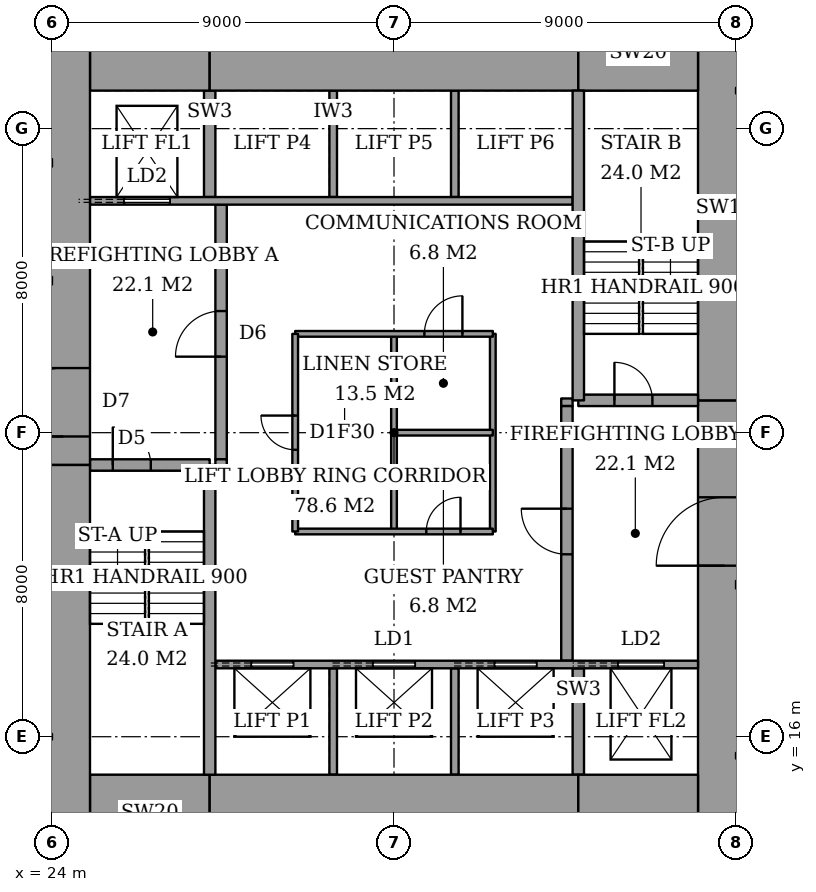
"""IFC4 building model, lengths in metres.
Left out: names, types, materials, properties, quantities, classifications, styles, units other than length and angle.
Written with IfcOpenShell. Run it as: python <this file> out.ifc"""

import sys

from ifc_helpers import new_model, si_unit, direction, frame, frame_2d, origin, place, context, subcontext, project, spatial, rectangle, extrude, element, fill, save


model = new_model("IFC4")
c1 = context("Model", 3, precision=1e-05, world=origin(), true_north=direction((0.0, 1.0)))
c2 = subcontext(c1, "Body", "Model", "MODEL_VIEW")
j1 = project(units=[si_unit("LENGTHUNIT", "METRE"), si_unit("PLANEANGLEUNIT", "RADIAN")], contexts=[c1])
p1 = place(None, origin())
s1 = spatial("IfcSite", under=j1, at=p1, CompositionType="ELEMENT")
p2 = place(p1, origin())
s2 = spatial("IfcBuilding", under=s1, at=p2, CompositionType="ELEMENT")
p3 = place(p2, frame((0.0, 0.0, 44.0)))
s3 = spatial("IfcBuildingStorey", under=s2, at=p3, CompositionType="ELEMENT", Elevation=44.0)
p4 = place(p3, frame((25.0, 14.0, 0.0), z_axis=(0.0, 0.0, 1.0), x_axis=(1.0, 0.0, 0.0)))
e1 = element("IfcWall", 1, at=p4, inside=s3, PredefinedType="SHEAR", context=c2, shape_type="SweptSolid", body=[
    extrude(rectangle(XDim=3.15, YDim=2.0, at=frame_2d((1.575, 0.0))), origin(), (0.0, 0.0, 1.0), 3.6),
])
p5 = place(p3, frame((28.15, 14.0, 0.0), z_axis=(0.0, 0.0, 1.0), x_axis=(1.0, 0.0, 0.0)))
e2 = element("IfcWall", 2, at=p5, inside=s3, PredefinedType="SHEAR", context=c2, shape_type="SweptSolid", body=[
    extrude(rectangle(XDim=9.7, YDim=2.0, at=frame_2d((4.85, 0.0))), origin(), (0.0, 0.0, 1.0), 3.6),
])
for number, where, z_axis, x_axis in (
    (3, (37.85, 14.0, 0.0), (0.0, 0.0, 1.0), (1.0, 0.0, 0.0)),
    (4, (25.0, 34.0, 0.0), (0.0, 0.0, 1.0), (1.0, 0.0, 0.0)),
):
    element("IfcWall", number, at=place(p3, frame(where, z_axis=z_axis, x_axis=x_axis)), inside=s3, PredefinedType="SHEAR", context=c2, shape_type="SweptSolid", body=[
        extrude(rectangle(XDim=3.15, YDim=2.0, at=frame_2d((1.575, 0.0))), origin(), (0.0, 0.0, 1.0), 3.6),
    ])
p6 = place(p3, frame((28.15, 34.0, 0.0), z_axis=(0.0, 0.0, 1.0), x_axis=(1.0, 0.0, 0.0)))
e5 = element("IfcWall", 5, at=p6, inside=s3, PredefinedType="SHEAR", context=c2, shape_type="SweptSolid", body=[
    extrude(rectangle(XDim=9.7, YDim=2.0, at=frame_2d((4.85, 0.0))), origin(), (0.0, 0.0, 1.0), 3.6),
])
p7 = place(p3, frame((37.85, 34.0, 0.0), z_axis=(0.0, 0.0, 1.0), x_axis=(1.0, 0.0, 0.0)))
e6 = element("IfcWall", 6, at=p7, inside=s3, PredefinedType="SHEAR", context=c2, shape_type="SweptSolid", body=[
    extrude(rectangle(XDim=3.15, YDim=2.0, at=frame_2d((1.575, 0.0))), origin(), (0.0, 0.0, 1.0), 3.6),
])
p8 = place(p3, frame((24.3, 13.0, 0.0), z_axis=(0.0, 0.0, 1.0), x_axis=(0.0, 1.0, 0.0)))
e7 = element("IfcWall", 7, at=p8, inside=s3, PredefinedType="SHEAR", context=c2, shape_type="SweptSolid", body=[
    extrude(rectangle(XDim=10.15, YDim=1.4, at=frame_2d((5.075, 0.0))), origin(), (0.0, 0.0, 1.0), 3.6),
])
p9 = place(p3, frame((24.3, 23.15, 0.0), z_axis=(0.0, 0.0, 1.0), x_axis=(0.0, 1.0, 0.0)))
e8 = element("IfcWall", 8, at=p9, inside=s3, PredefinedType="SHEAR", context=c2, shape_type="SweptSolid", body=[
    extrude(rectangle(XDim=11.85, YDim=1.4, at=frame_2d((5.925, 0.0))), origin(), (0.0, 0.0, 1.0), 3.6),
])
p10 = place(p9, frame((0.75, 0.0, 0.0)))
e9 = element("IfcOpeningElement", 9, at=p10, cuts=e8, PredefinedType="OPENING", context=c2, shape_type="SweptSolid", body=[
    extrude(rectangle(XDim=1.8, YDim=2.4, at=frame_2d((0.9, 1.2))), frame((0.0, 0.71, 0.0), z_axis=(0.0, -1.0, 0.0), x_axis=(1.0, 0.0, 0.0)), (0.0, 0.0, 1.0), 1.42),
])
p11 = place(p3, frame((41.7, 13.0, 0.0), z_axis=(0.0, 0.0, 1.0), x_axis=(0.0, 1.0, 0.0)))
e10 = element("IfcWall", 10, at=p11, inside=s3, PredefinedType="SHEAR", context=c2, shape_type="SweptSolid", body=[
    extrude(rectangle(XDim=11.85, YDim=1.4, at=frame_2d((5.925, 0.0))), origin(), (0.0, 0.0, 1.0), 3.6),
])
p12 = place(p11, frame((7.5, 0.0, 0.0)))
e11 = element("IfcOpeningElement", 11, at=p12, cuts=e10, PredefinedType="OPENING", context=c2, shape_type="SweptSolid", body=[
    extrude(rectangle(XDim=1.8, YDim=2.4, at=frame_2d((0.9, 1.2))), frame((0.0, 0.71, 0.0), z_axis=(0.0, -1.0, 0.0), x_axis=(1.0, 0.0, 0.0)), (0.0, 0.0, 1.0), 1.42),
])
p13 = place(p3, frame((41.7, 24.85, 0.0), z_axis=(0.0, 0.0, 1.0), x_axis=(0.0, 1.0, 0.0)))
e12 = element("IfcWall", 12, at=p13, inside=s3, PredefinedType="SHEAR", context=c2, shape_type="SweptSolid", body=[
    extrude(rectangle(XDim=10.15, YDim=1.4, at=frame_2d((5.075, 0.0))), origin(), (0.0, 0.0, 1.0), 3.6),
])
p14 = place(p3, frame((28.15, 15.0, 0.0), z_axis=(0.0, 0.0, 1.0), x_axis=(0.0, 1.0, 0.0)))
e13 = element("IfcWall", 13, at=p14, inside=s3, PredefinedType="SHEAR", context=c2, shape_type="SweptSolid", body=[
    extrude(rectangle(XDim=8.15, YDim=0.3, at=frame_2d((4.075, 0.0))), origin(), (0.0, 0.0, 1.0), 3.6),
])
p15 = place(p3, frame((25.0, 23.15, 0.0), z_axis=(0.0, 0.0, 1.0), x_axis=(1.0, 0.0, 0.0)))
e14 = element("IfcWall", 14, at=p15, inside=s3, PredefinedType="SHEAR", context=c2, shape_type="SweptSolid", body=[
    extrude(rectangle(XDim=3.15, YDim=0.3, at=frame_2d((1.575, 0.0))), origin(), (0.0, 0.0, 1.0), 3.6),
])
p16 = place(p15, frame((0.6, 0.0, 0.0)))
e15 = element("IfcOpeningElement", 15, at=p16, cuts=e14, PredefinedType="OPENING", context=c2, shape_type="SweptSolid", body=[
    extrude(rectangle(XDim=1.0, YDim=2.1, at=frame_2d((0.5, 1.05))), frame((0.0, 0.16, 0.0), z_axis=(0.0, -1.0, 0.0), x_axis=(1.0, 0.0, 0.0)), (0.0, 0.0, 1.0), 0.32),
])
p17 = place(p3, frame((37.85, 24.85, 0.0), z_axis=(0.0, 0.0, 1.0), x_axis=(0.0, 1.0, 0.0)))
e16 = element("IfcWall", 16, at=p17, inside=s3, PredefinedType="SHEAR", context=c2, shape_type="SweptSolid", body=[
    extrude(rectangle(XDim=8.15, YDim=0.3, at=frame_2d((4.075, 0.0))), origin(), (0.0, 0.0, 1.0), 3.6),
])
p18 = place(p3, frame((37.85, 24.85, 0.0), z_axis=(0.0, 0.0, 1.0), x_axis=(1.0, 0.0, 0.0)))
e17 = element("IfcWall", 17, at=p18, inside=s3, PredefinedType="SHEAR", context=c2, shape_type="SweptSolid", body=[
    extrude(rectangle(XDim=3.15, YDim=0.3, at=frame_2d((1.575, 0.0))), origin(), (0.0, 0.0, 1.0), 3.6),
])
p19 = place(p18, frame((0.95, 0.0, 0.0)))
e18 = element("IfcOpeningElement", 18, at=p19, cuts=e17, PredefinedType="OPENING", context=c2, shape_type="SweptSolid", body=[
    extrude(rectangle(XDim=1.0, YDim=2.1, at=frame_2d((0.5, 1.05))), frame((0.0, 0.16, 0.0), z_axis=(0.0, -1.0, 0.0), x_axis=(1.0, 0.0, 0.0)), (0.0, 0.0, 1.0), 0.32),
])
p20 = place(p3, frame((28.45, 23.3, 0.0), z_axis=(0.0, 0.0, 1.0), x_axis=(0.0, 1.0, 0.0)))
e19 = element("IfcWall", 19, at=p20, inside=s3, PredefinedType="PARTITIONING", context=c2, shape_type="SweptSolid", body=[
    extrude(rectangle(XDim=6.7, YDim=0.3, at=frame_2d((3.35, 0.0))), origin(), (0.0, 0.0, 1.0), 3.6),
])
p21 = place(p20, frame((2.7, 0.0, 0.0)))
e20 = element("IfcOpeningElement", 20, at=p21, cuts=e19, PredefinedType="OPENING", context=c2, shape_type="SweptSolid", body=[
    extrude(rectangle(XDim=1.2, YDim=2.1, at=frame_2d((0.6, 1.05))), frame((0.0, 0.16, 0.0), z_axis=(0.0, -1.0, 0.0), x_axis=(1.0, 0.0, 0.0)), (0.0, 0.0, 1.0), 0.32),
])
p22 = place(p3, frame((37.55, 18.0, 0.0), z_axis=(0.0, 0.0, 1.0), x_axis=(0.0, 1.0, 0.0)))
e21 = element("IfcWall", 21, at=p22, inside=s3, PredefinedType="PARTITIONING", context=c2, shape_type="SweptSolid", body=[
    extrude(rectangle(XDim=6.7, YDim=0.3, at=frame_2d((3.35, 0.0))), origin(), (0.0, 0.0, 1.0), 3.6),
])
p23 = place(p22, frame((2.8, 0.0, 0.0)))
e22 = element("IfcOpeningElement", 22, at=p23, cuts=e21, PredefinedType="OPENING", context=c2, shape_type="SweptSolid", body=[
    extrude(rectangle(XDim=1.2, YDim=2.1, at=frame_2d((0.6, 1.05))), frame((0.0, 0.16, 0.0), z_axis=(0.0, -1.0, 0.0), x_axis=(1.0, 0.0, 0.0)), (0.0, 0.0, 1.0), 0.32),
])
p24 = place(p3, frame((28.3, 17.9, 0.0), z_axis=(0.0, 0.0, 1.0), x_axis=(1.0, 0.0, 0.0)))
e23 = element("IfcWall", 23, at=p24, inside=s3, PredefinedType="PARTITIONING", context=c2, shape_type="SweptSolid", body=[
    extrude(rectangle(XDim=12.7, YDim=0.2, at=frame_2d((6.35, 0.0))), origin(), (0.0, 0.0, 1.0), 3.6),
])
p25 = place(p24, frame((0.95, 0.0, 0.0)))
e24 = element("IfcOpeningElement", 24, at=p25, cuts=e23, PredefinedType="OPENING", context=c2, shape_type="SweptSolid", body=[
    extrude(rectangle(XDim=1.1, YDim=2.1, at=frame_2d((0.55, 1.05))), frame((0.0, 0.11, 0.0), z_axis=(0.0, -1.0, 0.0), x_axis=(1.0, 0.0, 0.0)), (0.0, 0.0, 1.0), 0.22),
])
p26 = place(p24, frame((4.15, 0.0, 0.0)))
e25 = element("IfcOpeningElement", 25, at=p26, cuts=e23, PredefinedType="OPENING", context=c2, shape_type="SweptSolid", body=[
    extrude(rectangle(XDim=1.1, YDim=2.1, at=frame_2d((0.55, 1.05))), frame((0.0, 0.11, 0.0), z_axis=(0.0, -1.0, 0.0), x_axis=(1.0, 0.0, 0.0)), (0.0, 0.0, 1.0), 0.22),
])
p27 = place(p24, frame((7.35, 0.0, 0.0)))
e26 = element("IfcOpeningElement", 26, at=p27, cuts=e23, PredefinedType="OPENING", context=c2, shape_type="SweptSolid", body=[
    extrude(rectangle(XDim=1.1, YDim=2.1, at=frame_2d((0.55, 1.05))), frame((0.0, 0.11, 0.0), z_axis=(0.0, -1.0, 0.0), x_axis=(1.0, 0.0, 0.0)), (0.0, 0.0, 1.0), 0.22),
])
p28 = place(p24, frame((10.6, 0.0, 0.0)))
e27 = element("IfcOpeningElement", 27, at=p28, cuts=e23, PredefinedType="OPENING", context=c2, shape_type="SweptSolid", body=[
    extrude(rectangle(XDim=1.2, YDim=2.1, at=frame_2d((0.6, 1.05))), frame((0.0, 0.11, 0.0), z_axis=(0.0, -1.0, 0.0), x_axis=(1.0, 0.0, 0.0)), (0.0, 0.0, 1.0), 0.22),
])
p29 = place(p3, frame((25.0, 30.1, 0.0), z_axis=(0.0, 0.0, 1.0), x_axis=(1.0, 0.0, 0.0)))
e28 = element("IfcWall", 28, at=p29, inside=s3, PredefinedType="PARTITIONING", context=c2, shape_type="SweptSolid", body=[
    extrude(rectangle(XDim=12.7, YDim=0.2, at=frame_2d((6.35, 0.0))), origin(), (0.0, 0.0, 1.0), 3.6),
])
p30 = place(p29, frame((0.9, 0.0, 0.0)))
e29 = element("IfcOpeningElement", 29, at=p30, cuts=e28, PredefinedType="OPENING", context=c2, shape_type="SweptSolid", body=[
    extrude(rectangle(XDim=1.2, YDim=2.1, at=frame_2d((0.6, 1.05))), frame((0.0, 0.11, 0.0), z_axis=(0.0, -1.0, 0.0), x_axis=(1.0, 0.0, 0.0)), (0.0, 0.0, 1.0), 0.22),
])
for number, where, z_axis, x_axis in (
    (30, (31.4, 15.0, 0.0), (0.0, 0.0, 1.0), (0.0, 1.0, 0.0)),
    (31, (34.6, 15.0, 0.0), (0.0, 0.0, 1.0), (0.0, 1.0, 0.0)),
):
    element("IfcWall", number, at=place(p3, frame(where, z_axis=z_axis, x_axis=x_axis)), inside=s3, PredefinedType="PARTITIONING", context=c2, shape_type="SweptSolid", body=[
        extrude(rectangle(XDim=2.8, YDim=0.2, at=frame_2d((1.4, 0.0))), origin(), (0.0, 0.0, 1.0), 3.6),
    ])
p31 = place(p3, frame((37.85, 15.0, 0.0), z_axis=(0.0, 0.0, 1.0), x_axis=(0.0, 1.0, 0.0)))
e32 = element("IfcWall", 32, at=p31, inside=s3, PredefinedType="SHEAR", context=c2, shape_type="SweptSolid", body=[
    extrude(rectangle(XDim=2.8, YDim=0.3, at=frame_2d((1.4, 0.0))), origin(), (0.0, 0.0, 1.0), 3.6),
])
for number, where, z_axis, x_axis in (
    (33, (31.4, 30.2, 0.0), (0.0, 0.0, 1.0), (0.0, 1.0, 0.0)),
    (34, (34.6, 30.2, 0.0), (0.0, 0.0, 1.0), (0.0, 1.0, 0.0)),
):
    element("IfcWall", number, at=place(p3, frame(where, z_axis=z_axis, x_axis=x_axis)), inside=s3, PredefinedType="PARTITIONING", context=c2, shape_type="SweptSolid", body=[
        extrude(rectangle(XDim=2.8, YDim=0.2, at=frame_2d((1.4, 0.0))), origin(), (0.0, 0.0, 1.0), 3.6),
    ])
p32 = place(p3, frame((28.15, 30.2, 0.0), z_axis=(0.0, 0.0, 1.0), x_axis=(0.0, 1.0, 0.0)))
e35 = element("IfcWall", 35, at=p32, inside=s3, PredefinedType="SHEAR", context=c2, shape_type="SweptSolid", body=[
    extrude(rectangle(XDim=2.8, YDim=0.3, at=frame_2d((1.4, 0.0))), origin(), (0.0, 0.0, 1.0), 3.6),
])
for number, where, z_axis, x_axis in (
    (36, (28.3, 23.2, 0.0), (0.0, 0.0, 1.0), (1.0, 0.0, 0.0)),
    (37, (37.4, 24.8, 0.0), (0.0, 0.0, 1.0), (1.0, 0.0, 0.0)),
):
    element("IfcWall", number, at=place(p3, frame(where, z_axis=z_axis, x_axis=x_axis)), inside=s3, PredefinedType="PARTITIONING", context=c2, shape_type="SweptSolid", body=[
        extrude(rectangle(XDim=0.3, YDim=0.2, at=frame_2d((0.15, 0.0))), origin(), (0.0, 0.0, 1.0), 3.6),
    ])
p33 = place(p3, frame((30.4, 21.4, 0.0), z_axis=(0.0, 0.0, 1.0), x_axis=(1.0, 0.0, 0.0)))
e38 = element("IfcWall", 38, at=p33, inside=s3, PredefinedType="PARTITIONING", context=c2, shape_type="SweptSolid", body=[
    extrude(rectangle(XDim=5.2, YDim=0.15, at=frame_2d((2.6, 0.0))), origin(), (0.0, 0.0, 1.0), 3.35),
])
p34 = place(p33, frame((3.45, 0.0, 0.0)))
e39 = element("IfcOpeningElement", 39, at=p34, cuts=e38, PredefinedType="OPENING", context=c2, shape_type="SweptSolid", body=[
    extrude(rectangle(XDim=0.9, YDim=2.1, at=frame_2d((0.45, 1.05))), frame((0.0, 0.085, 0.0), z_axis=(0.0, -1.0, 0.0), x_axis=(1.0, 0.0, 0.0)), (0.0, 0.0, 1.0), 0.17),
])
p35 = place(p3, frame((30.4, 26.6, 0.0), z_axis=(0.0, 0.0, 1.0), x_axis=(1.0, 0.0, 0.0)))
e40 = element("IfcWall", 40, at=p35, inside=s3, PredefinedType="PARTITIONING", context=c2, shape_type="SweptSolid", body=[
    extrude(rectangle(XDim=5.2, YDim=0.15, at=frame_2d((2.6, 0.0))), origin(), (0.0, 0.0, 1.0), 3.35),
])
p36 = place(p35, frame((3.4, 0.0, 0.0)))
e41 = element("IfcOpeningElement", 41, at=p36, cuts=e40, PredefinedType="OPENING", context=c2, shape_type="SweptSolid", body=[
    extrude(rectangle(XDim=1.0, YDim=2.1, at=frame_2d((0.5, 1.05))), frame((0.0, 0.085, 0.0), z_axis=(0.0, -1.0, 0.0), x_axis=(1.0, 0.0, 0.0)), (0.0, 0.0, 1.0), 0.17),
])
p37 = place(p3, frame((30.4, 21.4, 0.0), z_axis=(0.0, 0.0, 1.0), x_axis=(0.0, 1.0, 0.0)))
e42 = element("IfcWall", 42, at=p37, inside=s3, PredefinedType="PARTITIONING", context=c2, shape_type="SweptSolid", body=[
    extrude(rectangle(XDim=5.2, YDim=0.15, at=frame_2d((2.6, 0.0))), origin(), (0.0, 0.0, 1.0), 3.35),
])
p38 = place(p37, frame((2.15, 0.0, 0.0)))
e43 = element("IfcOpeningElement", 43, at=p38, cuts=e42, PredefinedType="OPENING", context=c2, shape_type="SweptSolid", body=[
    extrude(rectangle(XDim=0.9, YDim=2.1, at=frame_2d((0.45, 1.05))), frame((0.0, 0.085, 0.0), z_axis=(0.0, -1.0, 0.0), x_axis=(1.0, 0.0, 0.0)), (0.0, 0.0, 1.0), 0.17),
])
p39 = place(p3, frame((35.6, 21.4, 0.0), z_axis=(0.0, 0.0, 1.0), x_axis=(0.0, 1.0, 0.0)))
e44 = element("IfcWall", 44, at=p39, inside=s3, PredefinedType="PARTITIONING", context=c2, shape_type="SweptSolid", body=[
    extrude(rectangle(XDim=5.2, YDim=0.15, at=frame_2d((2.6, 0.0))), origin(), (0.0, 0.0, 1.0), 3.35),
])
p40 = place(p3, frame((33.0, 24.0, 0.0), z_axis=(0.0, 0.0, 1.0), x_axis=(1.0, 0.0, 0.0)))
e45 = element("IfcWall", 45, at=p40, inside=s3, PredefinedType="PARTITIONING", context=c2, shape_type="SweptSolid", body=[
    extrude(rectangle(XDim=2.6, YDim=0.15, at=frame_2d((1.3, 0.0))), origin(), (0.0, 0.0, 1.0), 3.35),
])
p41 = place(p3, frame((33.0, 21.4, 0.0), z_axis=(0.0, 0.0, 1.0), x_axis=(0.0, 1.0, 0.0)))
e46 = element("IfcWall", 46, at=p41, inside=s3, PredefinedType="PARTITIONING", context=c2, shape_type="SweptSolid", body=[
    extrude(rectangle(XDim=5.2, YDim=0.15, at=frame_2d((2.6, 0.0))), origin(), (0.0, 0.0, 1.0), 3.35),
])
p42 = place(p16, origin())
e47 = element("IfcDoor", 47, at=p42, inside=s3, OperationType="SINGLE_SWING_RIGHT", PredefinedType="DOOR", context=c2, shape_type="SweptSolid", body=[
    extrude(rectangle(XDim=1.0, YDim=2.1, at=frame_2d((0.5, 1.05))), frame((0.0, 0.025, 0.0), z_axis=(0.0, -1.0, 0.0), x_axis=(1.0, 0.0, 0.0)), (0.0, 0.0, 1.0), 0.05),
])
fill(e15, e47)
p43 = place(p19, origin())
e48 = element("IfcDoor", 48, at=p43, inside=s3, OperationType="SINGLE_SWING_RIGHT", PredefinedType="DOOR", context=c2, shape_type="SweptSolid", body=[
    extrude(rectangle(XDim=1.0, YDim=2.1, at=frame_2d((0.5, 1.05))), frame((0.0, 0.025, 0.0), z_axis=(0.0, -1.0, 0.0), x_axis=(1.0, 0.0, 0.0)), (0.0, 0.0, 1.0), 0.05),
])
fill(e18, e48)
p44 = place(p21, origin())
e49 = element("IfcDoor", 49, at=p44, inside=s3, OperationType="SINGLE_SWING_RIGHT", PredefinedType="DOOR", context=c2, shape_type="SweptSolid", body=[
    extrude(rectangle(XDim=1.2, YDim=2.1, at=frame_2d((0.6, 1.05))), frame((0.0, 0.025, 0.0), z_axis=(0.0, -1.0, 0.0), x_axis=(1.0, 0.0, 0.0)), (0.0, 0.0, 1.0), 0.05),
])
fill(e20, e49)
p45 = place(p23, origin())
e50 = element("IfcDoor", 50, at=p45, inside=s3, OperationType="SINGLE_SWING_LEFT", PredefinedType="DOOR", context=c2, shape_type="SweptSolid", body=[
    extrude(rectangle(XDim=1.2, YDim=2.1, at=frame_2d((0.6, 1.05))), frame((0.0, 0.025, 0.0), z_axis=(0.0, -1.0, 0.0), x_axis=(1.0, 0.0, 0.0)), (0.0, 0.0, 1.0), 0.05),
])
fill(e22, e50)
p46 = place(p10, origin())
e51 = element("IfcDoor", 51, at=p46, inside=s3, OperationType="DOUBLE_DOOR_DOUBLE_SWING", PredefinedType="DOOR", context=c2, shape_type="SweptSolid", body=[
    extrude(rectangle(XDim=1.8, YDim=2.4, at=frame_2d((0.9, 1.2))), frame((0.0, 0.025, 0.0), z_axis=(0.0, -1.0, 0.0), x_axis=(1.0, 0.0, 0.0)), (0.0, 0.0, 1.0), 0.05),
])
fill(e9, e51)
p47 = place(p12, origin())
e52 = element("IfcDoor", 52, at=p47, inside=s3, OperationType="DOUBLE_DOOR_DOUBLE_SWING", PredefinedType="DOOR", context=c2, shape_type="SweptSolid", body=[
    extrude(rectangle(XDim=1.8, YDim=2.4, at=frame_2d((0.9, 1.2))), frame((0.0, 0.025, 0.0), z_axis=(0.0, -1.0, 0.0), x_axis=(1.0, 0.0, 0.0)), (0.0, 0.0, 1.0), 0.05),
])
fill(e11, e52)
p48 = place(p38, origin())
e53 = element("IfcDoor", 53, at=p48, inside=s3, OperationType="SINGLE_SWING_LEFT", PredefinedType="DOOR", context=c2, shape_type="SweptSolid", body=[
    extrude(rectangle(XDim=0.9, YDim=2.1, at=frame_2d((0.45, 1.05))), frame((0.0, 0.025, 0.0), z_axis=(0.0, -1.0, 0.0), x_axis=(1.0, 0.0, 0.0)), (0.0, 0.0, 1.0), 0.05),
])
fill(e43, e53)
p49 = place(p34, origin())
e54 = element("IfcDoor", 54, at=p49, inside=s3, OperationType="SINGLE_SWING_LEFT", PredefinedType="DOOR", context=c2, shape_type="SweptSolid", body=[
    extrude(rectangle(XDim=0.9, YDim=2.1, at=frame_2d((0.45, 1.05))), frame((0.0, 0.025, 0.0), z_axis=(0.0, -1.0, 0.0), x_axis=(1.0, 0.0, 0.0)), (0.0, 0.0, 1.0), 0.05),
])
fill(e39, e54)
p50 = place(p36, origin())
e55 = element("IfcDoor", 55, at=p50, inside=s3, OperationType="SINGLE_SWING_LEFT", PredefinedType="DOOR", context=c2, shape_type="SweptSolid", body=[
    extrude(rectangle(XDim=1.0, YDim=2.1, at=frame_2d((0.5, 1.05))), frame((0.0, 0.025, 0.0), z_axis=(0.0, -1.0, 0.0), x_axis=(1.0, 0.0, 0.0)), (0.0, 0.0, 1.0), 0.05),
])
fill(e41, e55)
p51 = place(p25, origin())
e56 = element("IfcDoor", 56, at=p51, inside=s3, OperationType="SLIDING_TO_LEFT", PredefinedType="DOOR", context=c2, shape_type="SweptSolid", body=[
    extrude(rectangle(XDim=1.1, YDim=2.1, at=frame_2d((0.55, 1.05))), frame((0.0, 0.025, 0.0), z_axis=(0.0, -1.0, 0.0), x_axis=(1.0, 0.0, 0.0)), (0.0, 0.0, 1.0), 0.05),
])
fill(e24, e56)
p52 = place(p26, origin())
e57 = element("IfcDoor", 57, at=p52, inside=s3, OperationType="SLIDING_TO_LEFT", PredefinedType="DOOR", context=c2, shape_type="SweptSolid", body=[
    extrude(rectangle(XDim=1.1, YDim=2.1, at=frame_2d((0.55, 1.05))), frame((0.0, 0.025, 0.0), z_axis=(0.0, -1.0, 0.0), x_axis=(1.0, 0.0, 0.0)), (0.0, 0.0, 1.0), 0.05),
])
fill(e25, e57)
p53 = place(p27, origin())
e58 = element("IfcDoor", 58, at=p53, inside=s3, OperationType="SLIDING_TO_LEFT", PredefinedType="DOOR", context=c2, shape_type="SweptSolid", body=[
    extrude(rectangle(XDim=1.1, YDim=2.1, at=frame_2d((0.55, 1.05))), frame((0.0, 0.025, 0.0), z_axis=(0.0, -1.0, 0.0), x_axis=(1.0, 0.0, 0.0)), (0.0, 0.0, 1.0), 0.05),
])
fill(e26, e58)
p54 = place(p30, origin())
e59 = element("IfcDoor", 59, at=p54, inside=s3, OperationType="SLIDING_TO_LEFT", PredefinedType="DOOR", context=c2, shape_type="SweptSolid", body=[
    extrude(rectangle(XDim=1.2, YDim=2.1, at=frame_2d((0.6, 1.05))), frame((0.0, 0.025, 0.0), z_axis=(0.0, -1.0, 0.0), x_axis=(1.0, 0.0, 0.0)), (0.0, 0.0, 1.0), 0.05),
])
fill(e29, e59)
p55 = place(p28, origin())
e60 = element("IfcDoor", 60, at=p55, inside=s3, OperationType="SLIDING_TO_LEFT", PredefinedType="DOOR", context=c2, shape_type="SweptSolid", body=[
    extrude(rectangle(XDim=1.2, YDim=2.1, at=frame_2d((0.6, 1.05))), frame((0.0, 0.025, 0.0), z_axis=(0.0, -1.0, 0.0), x_axis=(1.0, 0.0, 0.0)), (0.0, 0.0, 1.0), 0.05),
])
fill(e27, e60)
save(model, sys.argv[1])
